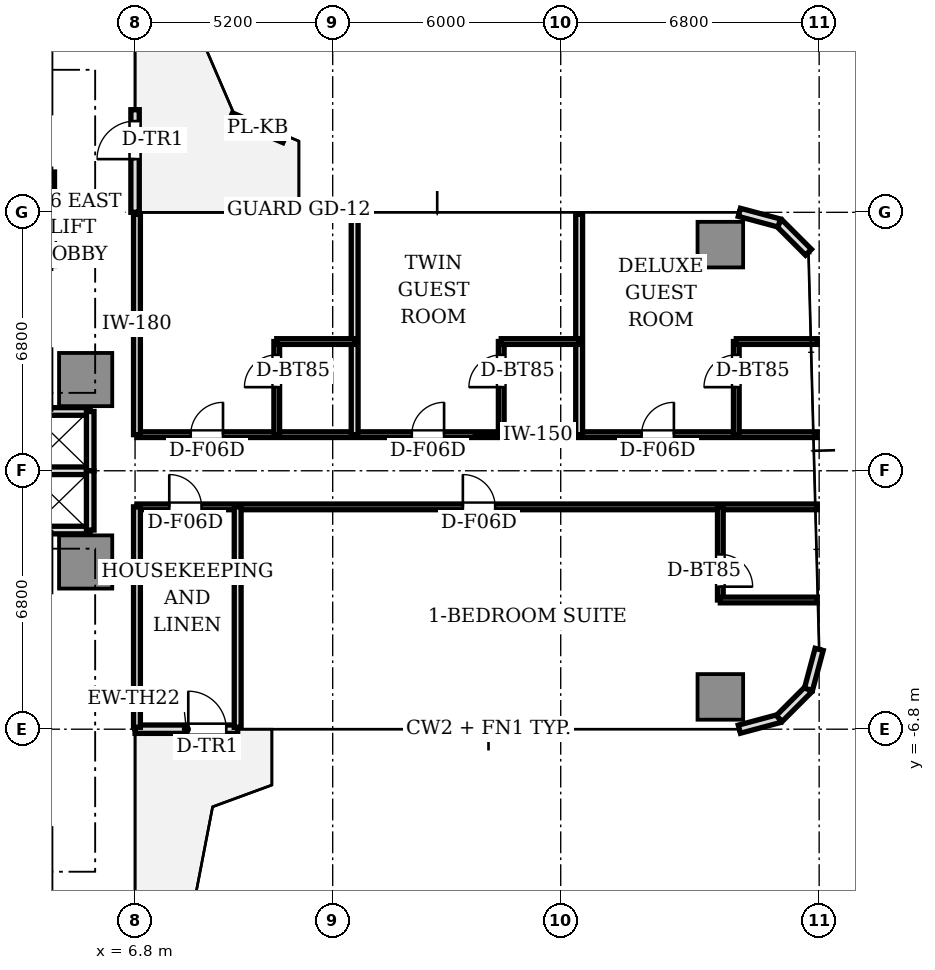
"""IFC4 building model, lengths in metres.
Left out: names, types, materials, properties, quantities, classifications, styles, units other than length and angle.
Written with IfcOpenShell. Run it as: python <this file> out.ifc"""

import sys

from ifc_helpers import new_model, si_unit, direction, frame, frame_2d, origin, origin_2d, place, context, subcontext, project, spatial, rectangle, extrude, source, transform, mapped, element, fill, save


model = new_model("IFC4")
c1 = context("Model", 3, precision=1e-05, world=origin(), true_north=direction((0.0, 1.0)))
c2 = subcontext(c1, "Body", "Model", "MODEL_VIEW")
j1 = project(units=[si_unit("LENGTHUNIT", "METRE"), si_unit("PLANEANGLEUNIT", "RADIAN")], contexts=[c1])
p1 = place(None, origin())
s1 = spatial("IfcSite", under=j1, at=p1, CompositionType="ELEMENT")
p2 = place(p1, origin())
s2 = spatial("IfcBuilding", under=s1, at=p2, CompositionType="ELEMENT")
p3 = place(p2, frame((0.0, 0.0, 26.45)))
s3 = spatial("IfcBuildingStorey", under=s2, at=p3, CompositionType="ELEMENT", Elevation=26.45)
m1 = source(origin(), c2, "Body", "SweptSolid", [
    extrude(rectangle(XDim=1.4, YDim=1.4, at=origin_2d()), origin(), (0.0, 0.0, 1.0), 3.11),
])
for number, where, z_axis, x_axis in (
    (1, (5.5, 2.4, 0.0), (0.0, 0.0, 1.0), (1.0, 0.0, 0.0)),
    (2, (5.5, -2.4, 0.0), (0.0, 0.0, 1.0), (1.0, 0.0, 0.0)),
):
    element("IfcColumn", number, at=place(p3, frame(where, z_axis=z_axis, x_axis=x_axis)), inside=s3, PredefinedType="COLUMN", context=c2, shape_type="MappedRepresentation", body=[
        mapped(m1, transform((0.0, 0.0, 0.0), scale=1.0)),
    ])
m2 = source(origin(), c2, "Body", "SweptSolid", [
    extrude(rectangle(XDim=1.2, YDim=1.2, at=origin_2d()), origin(), (0.0, 0.0, 1.0), 3.11),
])
for number, where, z_axis, x_axis in (
    (3, (22.2, -5.95, 0.0), (0.0, 0.0, 1.0), (1.0, 0.0, 0.0)),
    (4, (22.2, 5.95, 0.0), (0.0, 0.0, 1.0), (1.0, 0.0, 0.0)),
):
    element("IfcColumn", number, at=place(p3, frame(where, z_axis=z_axis, x_axis=x_axis)), inside=s3, PredefinedType="COLUMN", context=c2, shape_type="MappedRepresentation", body=[
        mapped(m2, transform((0.0, 0.0, 0.0), scale=1.0)),
    ])
p4 = place(p3, frame((6.8, -6.8, 0.0), z_axis=(0.0, 0.0, 1.0), x_axis=(1.0, 0.0, 0.0)))
e5 = element("IfcWall", 5, at=p4, inside=s3, PredefinedType="STANDARD", context=c2, shape_type="SweptSolid", body=[
    extrude(rectangle(XDim=2.7, YDim=0.22, at=frame_2d((1.35, 0.0))), origin(), (0.0, 0.0, 1.0), 3.11),
])
p5 = place(p4, frame((1.4, 0.0, 0.0)))
e6 = element("IfcOpeningElement", 6, at=p5, cuts=e5, PredefinedType="OPENING", context=c2, shape_type="SweptSolid", body=[
    extrude(rectangle(XDim=1.0, YDim=2.2, at=frame_2d((0.5, 1.1))), frame((0.0, 0.12, 0.0), z_axis=(0.0, -1.0, 0.0), x_axis=(1.0, 0.0, 0.0)), (0.0, 0.0, 1.0), 0.24),
])
for number, where, z_axis, x_axis in (
    (7, (22.7, -6.8, 0.0), (0.0, 0.0, 1.0), (0.966, 0.259, 0.0)),
    (8, (23.75, -6.519, 0.0), (0.0, 0.0, 1.0), (0.707, 0.707, 0.0)),
    (9, (24.519, -5.75, 0.0), (0.0, 0.0, 1.0), (0.259, 0.966, 0.0)),
    (10, (24.519, 5.75, 0.0), (0.0, 0.0, 1.0), (-0.707, 0.707, 0.0)),
    (11, (23.75, 6.519, 0.0), (0.0, 0.0, 1.0), (-0.966, 0.259, 0.0)),
):
    element("IfcWall", number, at=place(p3, frame(where, z_axis=z_axis, x_axis=x_axis)), inside=s3, PredefinedType="STANDARD", context=c2, shape_type="SweptSolid", body=[
        extrude(rectangle(XDim=1.087, YDim=0.22, at=frame_2d((0.543, 0.0))), origin(), (0.0, 0.0, 1.0), 3.11),
    ])
p6 = place(p3, frame((6.8, 6.8, 0.0), z_axis=(0.0, 0.0, 1.0), x_axis=(0.0, 1.0, 0.0)))
e12 = element("IfcWall", 12, at=p6, inside=s3, PredefinedType="STANDARD", context=c2, shape_type="SweptSolid", body=[
    extrude(rectangle(XDim=2.7, YDim=0.22, at=frame_2d((1.35, 0.0))), origin(), (0.0, 0.0, 1.0), 3.11),
])
p7 = place(p6, frame((1.4, 0.0, 0.0)))
e13 = element("IfcOpeningElement", 13, at=p7, cuts=e12, PredefinedType="OPENING", context=c2, shape_type="SweptSolid", body=[
    extrude(rectangle(XDim=1.0, YDim=2.2, at=frame_2d((0.5, 1.1))), frame((0.0, 0.12, 0.0), z_axis=(0.0, -1.0, 0.0), x_axis=(1.0, 0.0, 0.0)), (0.0, 0.0, 1.0), 0.24),
])
p8 = place(p3, frame((10.728, 8.727, 0.0), z_axis=(0.0, 0.0, 1.0), x_axis=(-0.920185318079, 0.391483052497, 0.0)))
e14 = element("IfcWall", 14, at=p8, inside=s3, PredefinedType="PARAPET", context=c2, shape_type="SweptSolid", body=[
    extrude(rectangle(XDim=1.525, YDim=0.2, at=frame_2d((0.762, 0.0))), origin(), (0.0, 0.0, 1.0), 0.65),
])
for number, where, z_axis, x_axis in (
    (15, (3.98, 1.56, 0.0), (0.0, 0.0, 1.0), (1.0, 0.0, 0.0)),
    (16, (3.98, -1.56, 0.0), (0.0, 0.0, 1.0), (1.0, 0.0, 0.0)),
    (17, (3.98, 0.0, 0.0), (0.0, 0.0, 1.0), (1.0, 0.0, 0.0)),
):
    element("IfcWall", number, at=place(p3, frame(where, z_axis=z_axis, x_axis=x_axis)), inside=s3, PredefinedType="SOLIDWALL", context=c2, shape_type="SweptSolid", body=[
        extrude(rectangle(XDim=1.64, YDim=0.2, at=frame_2d((0.82, 0.0))), origin(), (0.0, 0.0, 1.0), 2.66),
    ])
for number, where, z_axis, x_axis in (
    (18, (5.62, 0.0, 0.0), (0.0, 0.0, 1.0), (0.0, 1.0, 0.0)),
    (19, (5.62, -1.56, 0.0), (0.0, 0.0, 1.0), (0.0, 1.0, 0.0)),
):
    element("IfcWall", number, at=place(p3, frame(where, z_axis=z_axis, x_axis=x_axis)), inside=s3, PredefinedType="SOLIDWALL", context=c2, shape_type="SweptSolid", body=[
        extrude(rectangle(XDim=1.56, YDim=0.2, at=frame_2d((0.78, 0.0))), origin(), (0.0, 0.0, 1.0), 2.66),
    ])
p9 = place(p3, frame((4.58, 5.4, 0.0), z_axis=(0.0, 0.0, 1.0), x_axis=(0.0, 1.0, 0.0)))
e20 = element("IfcWall", 20, at=p9, inside=s3, PredefinedType="SOLIDWALL", context=c2, shape_type="SweptSolid", body=[
    extrude(rectangle(XDim=2.46, YDim=0.2, at=frame_2d((1.23, 0.0))), origin(), (0.0, 0.0, 1.0), 2.66),
])
p10 = place(p9, frame((0.55, 0.0, 0.0)))
e21 = element("IfcOpeningElement", 21, at=p10, cuts=e20, PredefinedType="OPENING", context=c2, shape_type="SweptSolid", body=[
    extrude(rectangle(XDim=0.85, YDim=2.1, at=frame_2d((0.425, 1.05))), frame((0.0, 0.11, 0.0), z_axis=(0.0, -1.0, 0.0), x_axis=(1.0, 0.0, 0.0)), (0.0, 0.0, 1.0), 0.22),
])
p11 = place(p3, frame((6.85, 0.95, 0.0), z_axis=(0.0, 0.0, 1.0), x_axis=(1.0, 0.0, 0.0)))
e22 = element("IfcWall", 22, at=p11, inside=s3, PredefinedType="PARTITIONING", context=c2, shape_type="SweptSolid", body=[
    extrude(rectangle(XDim=17.9, YDim=0.15, at=frame_2d((8.95, 0.0))), origin(), (0.0, 0.0, 1.0), 2.66),
])
p12 = place(p11, frame((1.414, 0.0, 0.0)))
e23 = element("IfcOpeningElement", 23, at=p12, cuts=e22, PredefinedType="OPENING", context=c2, shape_type="SweptSolid", body=[
    extrude(rectangle(XDim=0.85, YDim=2.1, at=frame_2d((0.425, 1.05))), frame((0.0, 0.085, 0.0), z_axis=(0.0, -1.0, 0.0), x_axis=(1.0, 0.0, 0.0)), (0.0, 0.0, 1.0), 0.17),
])
p13 = place(p11, frame((7.231, 0.0, 0.0)))
e24 = element("IfcOpeningElement", 24, at=p13, cuts=e22, PredefinedType="OPENING", context=c2, shape_type="SweptSolid", body=[
    extrude(rectangle(XDim=0.85, YDim=2.1, at=frame_2d((0.425, 1.05))), frame((0.0, 0.085, 0.0), z_axis=(0.0, -1.0, 0.0), x_axis=(1.0, 0.0, 0.0)), (0.0, 0.0, 1.0), 0.17),
])
p14 = place(p11, frame((13.278, 0.0, 0.0)))
e25 = element("IfcOpeningElement", 25, at=p14, cuts=e22, PredefinedType="OPENING", context=c2, shape_type="SweptSolid", body=[
    extrude(rectangle(XDim=0.85, YDim=2.1, at=frame_2d((0.425, 1.05))), frame((0.0, 0.085, 0.0), z_axis=(0.0, -1.0, 0.0), x_axis=(1.0, 0.0, 0.0)), (0.0, 0.0, 1.0), 0.17),
])
p15 = place(p3, frame((6.85, -0.95, 0.0), z_axis=(0.0, 0.0, 1.0), x_axis=(1.0, 0.0, 0.0)))
e26 = element("IfcWall", 26, at=p15, inside=s3, PredefinedType="PARTITIONING", context=c2, shape_type="SweptSolid", body=[
    extrude(rectangle(XDim=17.9, YDim=0.15, at=frame_2d((8.95, 0.0))), origin(), (0.0, 0.0, 1.0), 2.66),
])
p16 = place(p15, frame((0.85, 0.0, 0.0)))
e27 = element("IfcOpeningElement", 27, at=p16, cuts=e26, PredefinedType="OPENING", context=c2, shape_type="SweptSolid", body=[
    extrude(rectangle(XDim=0.85, YDim=2.1, at=frame_2d((0.425, 1.05))), frame((0.0, 0.085, 0.0), z_axis=(0.0, -1.0, 0.0), x_axis=(1.0, 0.0, 0.0)), (0.0, 0.0, 1.0), 0.17),
])
p17 = place(p15, frame((8.575, 0.0, 0.0)))
e28 = element("IfcOpeningElement", 28, at=p17, cuts=e26, PredefinedType="OPENING", context=c2, shape_type="SweptSolid", body=[
    extrude(rectangle(XDim=0.85, YDim=2.1, at=frame_2d((0.425, 1.05))), frame((0.0, 0.085, 0.0), z_axis=(0.0, -1.0, 0.0), x_axis=(1.0, 0.0, 0.0)), (0.0, 0.0, 1.0), 0.17),
])
for number, where, z_axis, x_axis in (
    (29, (6.85, 0.95, 0.0), (0.0, 0.0, 1.0), (0.0, 1.0, 0.0)),
    (30, (6.85, -6.75, 0.0), (0.0, 0.0, 1.0), (0.0, 1.0, 0.0)),
    (31, (12.578, 0.95, 0.0), (0.0, 0.0, 1.0), (0.0, 1.0, 0.0)),
):
    element("IfcWall", number, at=place(p3, frame(where, z_axis=z_axis, x_axis=x_axis)), inside=s3, PredefinedType="PARTITIONING", context=c2, shape_type="SweptSolid", body=[
        extrude(rectangle(XDim=5.8, YDim=0.18, at=frame_2d((2.9, 0.0))), origin(), (0.0, 0.0, 1.0), 2.66),
    ])
p18 = place(p3, frame((10.528, 0.95, 0.0), z_axis=(0.0, 0.0, 1.0), x_axis=(0.0, 1.0, 0.0)))
e32 = element("IfcWall", 32, at=p18, inside=s3, PredefinedType="PARTITIONING", context=c2, shape_type="SweptSolid", body=[
    extrude(rectangle(XDim=2.45, YDim=0.15, at=frame_2d((1.225, 0.0))), origin(), (0.0, 0.0, 1.0), 2.66),
])
p19 = place(p18, frame((1.25, 0.0, 0.0)))
e33 = element("IfcOpeningElement", 33, at=p19, cuts=e32, PredefinedType="OPENING", context=c2, shape_type="SweptSolid", body=[
    extrude(rectangle(XDim=0.85, YDim=2.1, at=frame_2d((0.425, 1.05))), frame((0.0, 0.085, 0.0), z_axis=(0.0, -1.0, 0.0), x_axis=(1.0, 0.0, 0.0)), (0.0, 0.0, 1.0), 0.17),
])
p20 = place(p3, frame((10.528, 3.4, 0.0), z_axis=(0.0, 0.0, 1.0), x_axis=(1.0, 0.0, 0.0)))
e34 = element("IfcWall", 34, at=p20, inside=s3, PredefinedType="PARTITIONING", context=c2, shape_type="SweptSolid", body=[
    extrude(rectangle(XDim=2.05, YDim=0.15, at=frame_2d((1.025, 0.0))), origin(), (0.0, 0.0, 1.0), 2.63),
])
p21 = place(p3, frame((18.485, 0.95, 0.0), z_axis=(0.0, 0.0, 1.0), x_axis=(0.0, 1.0, 0.0)))
e35 = element("IfcWall", 35, at=p21, inside=s3, PredefinedType="PARTITIONING", context=c2, shape_type="SweptSolid", body=[
    extrude(rectangle(XDim=5.8, YDim=0.18, at=frame_2d((2.9, 0.0))), origin(), (0.0, 0.0, 1.0), 2.66),
])
p22 = place(p3, frame((16.435, 0.95, 0.0), z_axis=(0.0, 0.0, 1.0), x_axis=(0.0, 1.0, 0.0)))
e36 = element("IfcWall", 36, at=p22, inside=s3, PredefinedType="PARTITIONING", context=c2, shape_type="SweptSolid", body=[
    extrude(rectangle(XDim=2.45, YDim=0.15, at=frame_2d((1.225, 0.0))), origin(), (0.0, 0.0, 1.0), 2.66),
])
p23 = place(p22, frame((1.25, 0.0, 0.0)))
e37 = element("IfcOpeningElement", 37, at=p23, cuts=e36, PredefinedType="OPENING", context=c2, shape_type="SweptSolid", body=[
    extrude(rectangle(XDim=0.85, YDim=2.1, at=frame_2d((0.425, 1.05))), frame((0.0, 0.085, 0.0), z_axis=(0.0, -1.0, 0.0), x_axis=(1.0, 0.0, 0.0)), (0.0, 0.0, 1.0), 0.17),
])
p24 = place(p3, frame((16.435, 3.4, 0.0), z_axis=(0.0, 0.0, 1.0), x_axis=(1.0, 0.0, 0.0)))
e38 = element("IfcWall", 38, at=p24, inside=s3, PredefinedType="PARTITIONING", context=c2, shape_type="SweptSolid", body=[
    extrude(rectangle(XDim=2.05, YDim=0.15, at=frame_2d((1.025, 0.0))), origin(), (0.0, 0.0, 1.0), 2.63),
])
p25 = place(p3, frame((22.62, 0.95, 0.0), z_axis=(0.0, 0.0, 1.0), x_axis=(0.0, 1.0, 0.0)))
e39 = element("IfcWall", 39, at=p25, inside=s3, PredefinedType="PARTITIONING", context=c2, shape_type="SweptSolid", body=[
    extrude(rectangle(XDim=2.45, YDim=0.15, at=frame_2d((1.225, 0.0))), origin(), (0.0, 0.0, 1.0), 2.66),
])
p26 = place(p25, frame((1.25, 0.0, 0.0)))
e40 = element("IfcOpeningElement", 40, at=p26, cuts=e39, PredefinedType="OPENING", context=c2, shape_type="SweptSolid", body=[
    extrude(rectangle(XDim=0.85, YDim=2.1, at=frame_2d((0.425, 1.05))), frame((0.0, 0.085, 0.0), z_axis=(0.0, -1.0, 0.0), x_axis=(1.0, 0.0, 0.0)), (0.0, 0.0, 1.0), 0.17),
])
p27 = place(p3, frame((22.62, 3.4, 0.0), z_axis=(0.0, 0.0, 1.0), x_axis=(1.0, 0.0, 0.0)))
e41 = element("IfcWall", 41, at=p27, inside=s3, PredefinedType="PARTITIONING", context=c2, shape_type="SweptSolid", body=[
    extrude(rectangle(XDim=2.13, YDim=0.15, at=frame_2d((1.065, 0.0))), origin(), (0.0, 0.0, 1.0), 2.66),
])
p28 = place(p3, frame((9.5, -0.95, 0.0), z_axis=(0.0, 0.0, 1.0), x_axis=(0.0, -1.0, 0.0)))
e42 = element("IfcWall", 42, at=p28, inside=s3, PredefinedType="PARTITIONING", context=c2, shape_type="SweptSolid", body=[
    extrude(rectangle(XDim=5.8, YDim=0.18, at=frame_2d((2.9, 0.0))), origin(), (0.0, 0.0, 1.0), 2.66),
])
p29 = place(p3, frame((22.2, -0.95, 0.0), z_axis=(0.0, 0.0, 1.0), x_axis=(0.0, -1.0, 0.0)))
e43 = element("IfcWall", 43, at=p29, inside=s3, PredefinedType="PARTITIONING", context=c2, shape_type="SweptSolid", body=[
    extrude(rectangle(XDim=2.45, YDim=0.15, at=frame_2d((1.225, 0.0))), origin(), (0.0, 0.0, 1.0), 2.58),
])
p30 = place(p29, frame((1.25, 0.0, 0.0)))
e44 = element("IfcOpeningElement", 44, at=p30, cuts=e43, PredefinedType="OPENING", context=c2, shape_type="SweptSolid", body=[
    extrude(rectangle(XDim=0.85, YDim=2.1, at=frame_2d((0.425, 1.05))), frame((0.0, 0.085, 0.0), z_axis=(0.0, -1.0, 0.0), x_axis=(1.0, 0.0, 0.0)), (0.0, 0.0, 1.0), 0.17),
])
p31 = place(p3, frame((22.2, -3.4, 0.0), z_axis=(0.0, 0.0, 1.0), x_axis=(1.0, 0.0, 0.0)))
e45 = element("IfcWall", 45, at=p31, inside=s3, PredefinedType="PARTITIONING", context=c2, shape_type="SweptSolid", body=[
    extrude(rectangle(XDim=2.55, YDim=0.15, at=frame_2d((1.275, 0.0))), origin(), (0.0, 0.0, 1.0), 2.66),
])
m3 = source(origin(), c2, "Body", "SweptSolid", [
    extrude(rectangle(XDim=1.0, YDim=0.05, at=origin_2d()), origin(), (0.0, 0.0, 1.0), 2.2),
])
p32 = place(p5, frame((0.5, 0.0, 0.0)))
e46 = element("IfcDoor", 46, at=p32, inside=s3, OperationType="SINGLE_SWING_LEFT", PredefinedType="DOOR", context=c2, shape_type="MappedRepresentation", body=[
    mapped(m3, transform((0.0, 0.0, 0.0), scale=1.0)),
])
fill(e6, e46)
p33 = place(p7, frame((0.5, 0.0, 0.0)))
e47 = element("IfcDoor", 47, at=p33, inside=s3, OperationType="SINGLE_SWING_LEFT", PredefinedType="DOOR", context=c2, shape_type="MappedRepresentation", body=[
    mapped(m3, transform((0.0, 0.0, 0.0), scale=1.0)),
])
fill(e13, e47)
m4 = source(origin(), c2, "Body", "SweptSolid", [
    extrude(rectangle(XDim=0.85, YDim=0.05, at=origin_2d()), origin(), (0.0, 0.0, 1.0), 2.1),
])
p34 = place(p19, frame((0.425, 0.0, 0.0)))
e48 = element("IfcDoor", 48, at=p34, inside=s3, OperationType="SINGLE_SWING_LEFT", PredefinedType="DOOR", context=c2, shape_type="MappedRepresentation", body=[
    mapped(m4, transform((0.0, 0.0, 0.0), scale=1.0)),
])
fill(e33, e48)
p35 = place(p12, frame((0.425, 0.0, 0.0)))
e49 = element("IfcDoor", 49, at=p35, inside=s3, OperationType="SINGLE_SWING_RIGHT", PredefinedType="DOOR", context=c2, shape_type="MappedRepresentation", body=[
    mapped(m4, transform((0.0, 0.0, 0.0), scale=1.0)),
])
fill(e23, e49)
p36 = place(p23, frame((0.425, 0.0, 0.0)))
e50 = element("IfcDoor", 50, at=p36, inside=s3, OperationType="SINGLE_SWING_LEFT", PredefinedType="DOOR", context=c2, shape_type="MappedRepresentation", body=[
    mapped(m4, transform((0.0, 0.0, 0.0), scale=1.0)),
])
fill(e37, e50)
p37 = place(p13, frame((0.425, 0.0, 0.0)))
e51 = element("IfcDoor", 51, at=p37, inside=s3, OperationType="SINGLE_SWING_RIGHT", PredefinedType="DOOR", context=c2, shape_type="MappedRepresentation", body=[
    mapped(m4, transform((0.0, 0.0, 0.0), scale=1.0)),
])
fill(e24, e51)
p38 = place(p26, frame((0.425, 0.0, 0.0)))
e52 = element("IfcDoor", 52, at=p38, inside=s3, OperationType="SINGLE_SWING_LEFT", PredefinedType="DOOR", context=c2, shape_type="MappedRepresentation", body=[
    mapped(m4, transform((0.0, 0.0, 0.0), scale=1.0)),
])
fill(e40, e52)
p39 = place(p14, frame((0.425, 0.0, 0.0)))
e53 = element("IfcDoor", 53, at=p39, inside=s3, OperationType="SINGLE_SWING_RIGHT", PredefinedType="DOOR", context=c2, shape_type="MappedRepresentation", body=[
    mapped(m4, transform((0.0, 0.0, 0.0), scale=1.0)),
])
fill(e25, e53)
p40 = place(p16, frame((0.425, 0.0, 0.0)))
e54 = element("IfcDoor", 54, at=p40, inside=s3, OperationType="SINGLE_SWING_LEFT", PredefinedType="DOOR", context=c2, shape_type="MappedRepresentation", body=[
    mapped(m4, transform((0.0, 0.0, 0.0), scale=1.0)),
])
fill(e27, e54)
p41 = place(p30, frame((0.425, 0.0, 0.0)))
e55 = element("IfcDoor", 55, at=p41, inside=s3, OperationType="SINGLE_SWING_RIGHT", PredefinedType="DOOR", context=c2, shape_type="MappedRepresentation", body=[
    mapped(m4, transform((0.0, 0.0, 0.0), scale=1.0)),
])
fill(e44, e55)
p42 = place(p17, frame((0.425, 0.0, 0.0)))
e56 = element("IfcDoor", 56, at=p42, inside=s3, OperationType="SINGLE_SWING_LEFT", PredefinedType="DOOR", context=c2, shape_type="MappedRepresentation", body=[
    mapped(m4, transform((0.0, 0.0, 0.0), scale=1.0)),
])
fill(e28, e56)
save(model, sys.argv[1])
